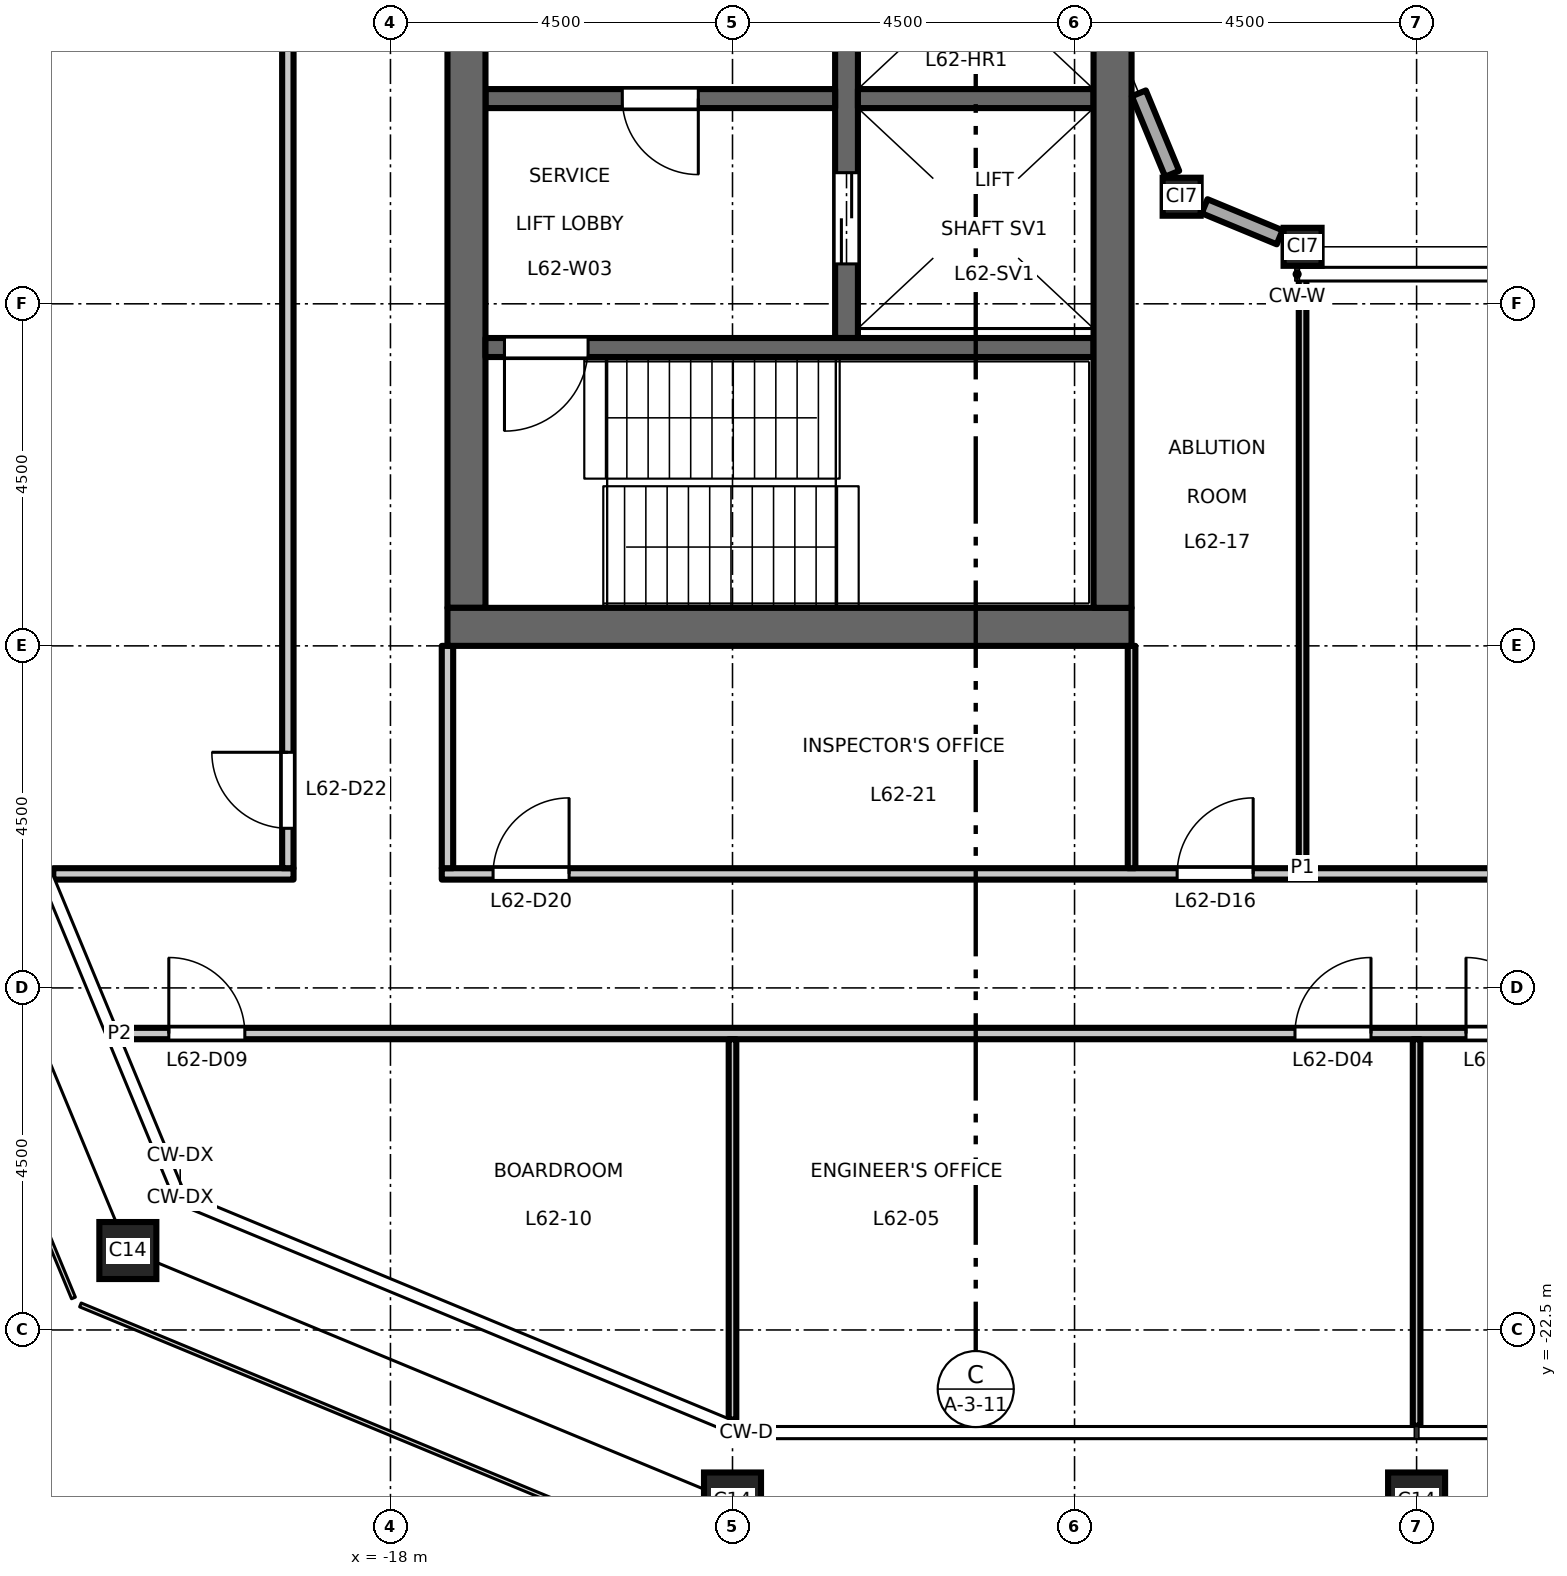
"""IFC4 building model, lengths in metres.
Left out: names, types, materials, properties, quantities, classifications, styles, units other than length and angle.
Written with IfcOpenShell. Run it as: python <this file> out.ifc"""

import sys

from ifc_helpers import new_model, si_unit, direction, frame, frame_2d, origin, origin_2d, place, context, subcontext, project, spatial, rectangle, hollow_rectangle, extrude, element, fill, save


model = new_model("IFC4")
c1 = context("Model", 3, precision=1e-05, world=origin(), true_north=direction((0.0, 1.0)))
c2 = subcontext(c1, "Body", "Model", "MODEL_VIEW")
j1 = project(units=[si_unit("LENGTHUNIT", "METRE"), si_unit("PLANEANGLEUNIT", "RADIAN")], contexts=[c1])
p1 = place(None, origin())
s1 = spatial("IfcSite", under=j1, at=p1, CompositionType="ELEMENT")
p2 = place(p1, origin())
s2 = spatial("IfcBuilding", under=s1, at=p2, CompositionType="ELEMENT")
p3 = place(p2, frame((0.0, 0.0, 289.7)))
s3 = spatial("IfcBuildingStorey", under=s2, at=p3, CompositionType="ELEMENT", Elevation=289.7)
for number, where, z_axis, x_axis in (
    (1, (-13.5, -24.75, 0.0), (0.0, 0.0, 1.0), (1.0, 0.0, 0.0)),
    (2, (-4.5, -24.75, 0.0), (0.0, 0.0, 1.0), (1.0, 0.0, 0.0)),
    (3, (-21.455, -21.455, 0.0), (0.0, 0.0, 1.0), (1.0, 0.0, 0.0)),
):
    element("IfcColumn", number, at=place(p3, frame(where, z_axis=z_axis, x_axis=x_axis)), inside=s3, PredefinedType="COLUMN", context=c2, shape_type="SweptSolid", body=[
        extrude(hollow_rectangle(XDim=0.75, YDim=0.75, WallThickness=0.04, at=origin_2d()), origin(), (0.0, 0.0, 1.0), 4.5),
    ])
for number, where, z_axis, x_axis in (
    (4, (-7.591, -7.591, 0.0), (0.0, 0.0, 1.0), (1.0, 0.0, 0.0)),
    (5, (-6.0, -8.25, 0.0), (0.0, 0.0, 1.0), (1.0, 0.0, 0.0)),
):
    element("IfcColumn", number, at=place(p3, frame(where, z_axis=z_axis, x_axis=x_axis)), inside=s3, PredefinedType="COLUMN", context=c2, shape_type="SweptSolid", body=[
        extrude(hollow_rectangle(XDim=0.5, YDim=0.5, WallThickness=0.025, at=origin_2d()), origin(), (0.0, 0.0, 1.0), 4.5),
    ])
p4 = place(p3, frame((-12.0, -9.45, 0.0), z_axis=(0.0, 0.0, 1.0), x_axis=(0.0, 1.0, 0.0)))
e6 = element("IfcWall", 6, at=p4, inside=s3, PredefinedType="SHEAR", context=c2, shape_type="SweptSolid", body=[
    extrude(rectangle(XDim=18.9, YDim=0.3, at=frame_2d((9.45, 0.0))), origin(), (0.0, 0.0, 1.0), 4.35),
])
p5 = place(p4, frame((4.725, 0.0, 0.0)))
e7 = element("IfcOpeningElement", 7, at=p5, cuts=e6, PredefinedType="OPENING", context=c2, shape_type="SweptSolid", body=[
    extrude(rectangle(XDim=1.1, YDim=2.1, at=frame_2d((0.55, 1.05))), frame((0.0, 0.16, 0.0), z_axis=(0.0, -1.0, 0.0), x_axis=(1.0, 0.0, 0.0)), (0.0, 0.0, 1.0), 0.32),
])
p6 = place(p4, frame((7.875, 0.0, 0.0)))
e8 = element("IfcOpeningElement", 8, at=p6, cuts=e6, PredefinedType="OPENING", context=c2, shape_type="SweptSolid", body=[
    extrude(rectangle(XDim=1.1, YDim=2.1, at=frame_2d((0.55, 1.05))), frame((0.0, 0.16, 0.0), z_axis=(0.0, -1.0, 0.0), x_axis=(1.0, 0.0, 0.0)), (0.0, 0.0, 1.0), 0.32),
])
p7 = place(p4, frame((11.025, 0.0, 0.0)))
e9 = element("IfcOpeningElement", 9, at=p7, cuts=e6, PredefinedType="OPENING", context=c2, shape_type="SweptSolid", body=[
    extrude(rectangle(XDim=1.1, YDim=2.1, at=frame_2d((0.55, 1.05))), frame((0.0, 0.16, 0.0), z_axis=(0.0, -1.0, 0.0), x_axis=(1.0, 0.0, 0.0)), (0.0, 0.0, 1.0), 0.32),
])
p8 = place(p4, frame((14.175, 0.0, 0.0)))
e10 = element("IfcOpeningElement", 10, at=p8, cuts=e6, PredefinedType="OPENING", context=c2, shape_type="SweptSolid", body=[
    extrude(rectangle(XDim=1.1, YDim=2.1, at=frame_2d((0.55, 1.05))), frame((0.0, 0.16, 0.0), z_axis=(0.0, -1.0, 0.0), x_axis=(1.0, 0.0, 0.0)), (0.0, 0.0, 1.0), 0.32),
])
p9 = place(p4, frame((16.725, 0.0, 0.0)))
e11 = element("IfcOpeningElement", 11, at=p9, cuts=e6, PredefinedType="OPENING", context=c2, shape_type="SweptSolid", body=[
    extrude(rectangle(XDim=1.2, YDim=2.1, at=frame_2d((0.6, 1.05))), frame((0.0, 0.16, 0.0), z_axis=(0.0, -1.0, 0.0), x_axis=(1.0, 0.0, 0.0)), (0.0, 0.0, 1.0), 0.32),
])
p10 = place(p4, frame((0.975, 0.0, 0.0)))
e12 = element("IfcOpeningElement", 12, at=p10, cuts=e6, PredefinedType="OPENING", context=c2, shape_type="SweptSolid", body=[
    extrude(rectangle(XDim=1.2, YDim=2.1, at=frame_2d((0.6, 1.05))), frame((0.0, 0.16, 0.0), z_axis=(0.0, -1.0, 0.0), x_axis=(1.0, 0.0, 0.0)), (0.0, 0.0, 1.0), 0.32),
])
p11 = place(p3, frame((-12.15, -6.3, 0.0), z_axis=(0.0, 0.0, 1.0), x_axis=(-1.0, 0.0, 0.0)))
e13 = element("IfcWall", 13, at=p11, inside=s3, PredefinedType="SHEAR", context=c2, shape_type="SweptSolid", body=[
    extrude(rectangle(XDim=4.6, YDim=0.25, at=frame_2d((2.3, 0.0))), origin(), (0.0, 0.0, 1.0), 4.35),
])
p12 = place(p11, frame((1.8, 0.0, 0.0)))
e14 = element("IfcOpeningElement", 14, at=p12, cuts=e13, PredefinedType="OPENING", context=c2, shape_type="SweptSolid", body=[
    extrude(rectangle(XDim=1.0, YDim=2.1, at=frame_2d((0.5, 1.05))), frame((0.0, 0.135, 0.0), z_axis=(0.0, -1.0, 0.0), x_axis=(1.0, 0.0, 0.0)), (0.0, 0.0, 1.0), 0.27),
])
p13 = place(p3, frame((-17.0, -13.0, 0.0), z_axis=(0.0, 0.0, 1.0), x_axis=(0.0, 1.0, 0.0)))
e15 = element("IfcWall", 15, at=p13, inside=s3, PredefinedType="SHEAR", context=c2, shape_type="SweptSolid", body=[
    extrude(rectangle(XDim=26.0, YDim=0.5, at=frame_2d((13.0, 0.0))), origin(), (0.0, 0.0, 1.0), 4.35),
])
p14 = place(p13, frame((16.825, 0.0, 0.0)))
e16 = element("IfcOpeningElement", 16, at=p14, cuts=e15, PredefinedType="OPENING", context=c2, shape_type="SweptSolid", body=[
    extrude(rectangle(XDim=1.8, YDim=2.1, at=frame_2d((0.9, 1.05))), frame((0.0, 0.26, 0.0), z_axis=(0.0, -1.0, 0.0), x_axis=(1.0, 0.0, 0.0)), (0.0, 0.0, 1.0), 0.52),
])
p15 = place(p13, frame((7.375, 0.0, 0.0)))
e17 = element("IfcOpeningElement", 17, at=p15, cuts=e15, PredefinedType="OPENING", context=c2, shape_type="SweptSolid", body=[
    extrude(rectangle(XDim=1.8, YDim=2.1, at=frame_2d((0.9, 1.05))), frame((0.0, 0.26, 0.0), z_axis=(0.0, -1.0, 0.0), x_axis=(1.0, 0.0, 0.0)), (0.0, 0.0, 1.0), 0.52),
])
p16 = place(p3, frame((-8.75, -6.3, 0.0), z_axis=(0.0, 0.0, 1.0), x_axis=(-1.0, 0.0, 0.0)))
e18 = element("IfcWall", 18, at=p16, inside=s3, PredefinedType="SHEAR", context=c2, shape_type="SweptSolid", body=[
    extrude(rectangle(XDim=3.1, YDim=0.25, at=frame_2d((1.55, 0.0))), origin(), (0.0, 0.0, 1.0), 4.35),
])
p17 = place(p3, frame((-8.75, -9.575, 0.0), z_axis=(0.0, 0.0, 1.0), x_axis=(-1.0, 0.0, 0.0)))
e19 = element("IfcWall", 19, at=p17, inside=s3, PredefinedType="SHEAR", context=c2, shape_type="SweptSolid", body=[
    extrude(rectangle(XDim=8.0, YDim=0.25, at=frame_2d((4.0, 0.0))), origin(), (0.0, 0.0, 1.0), 4.35),
])
p18 = place(p17, frame((6.65, 0.0, 0.0)))
e20 = element("IfcOpeningElement", 20, at=p18, cuts=e19, PredefinedType="OPENING", context=c2, shape_type="SweptSolid", body=[
    extrude(rectangle(XDim=1.1, YDim=2.1, at=frame_2d((0.55, 1.05))), frame((0.0, 0.135, 0.0), z_axis=(0.0, -1.0, 0.0), x_axis=(1.0, 0.0, 0.0)), (0.0, 0.0, 1.0), 0.27),
])
p19 = place(p3, frame((-8.25, -13.25, 0.0), z_axis=(0.0, 0.0, 1.0), x_axis=(-1.0, 0.0, 0.0)))
e21 = element("IfcWall", 21, at=p19, inside=s3, PredefinedType="SHEAR", context=c2, shape_type="SweptSolid", body=[
    extrude(rectangle(XDim=9.0, YDim=0.5, at=frame_2d((4.5, 0.0))), origin(), (0.0, 0.0, 1.0), 4.35),
])
p20 = place(p3, frame((-8.5, -13.0, 0.0), z_axis=(0.0, 0.0, 1.0), x_axis=(0.0, 1.0, 0.0)))
e22 = element("IfcWall", 22, at=p20, inside=s3, PredefinedType="SHEAR", context=c2, shape_type="SweptSolid", body=[
    extrude(rectangle(XDim=26.0, YDim=0.5, at=frame_2d((13.0, 0.0))), origin(), (0.0, 0.0, 1.0), 4.35),
])
p21 = place(p3, frame((-8.154, -6.231, 0.0), z_axis=(0.0, 0.0, 1.0), x_axis=(0.382571404949, -0.923925927829, 0.0)))
e23 = element("IfcWall", 23, at=p21, inside=s3, PredefinedType="STANDARD", context=c2, shape_type="SweptSolid", body=[
    extrude(rectangle(XDim=1.146, YDim=0.2, at=frame_2d((0.573, 0.0))), origin(), (0.0, 0.0, 1.0), 4.01),
])
p22 = place(p3, frame((-7.289, -7.716, 0.0), z_axis=(0.0, 0.0, 1.0), x_axis=(0.923919409248, -0.382587147216, 0.0)))
e24 = element("IfcWall", 24, at=p22, inside=s3, PredefinedType="STANDARD", context=c2, shape_type="SweptSolid", body=[
    extrude(rectangle(XDim=1.069, YDim=0.2, at=frame_2d((0.534, 0.0))), origin(), (0.0, 0.0, 1.0), 4.01),
])
p23 = place(p3, frame((-21.566, -18.6, 0.0), z_axis=(0.0, 0.0, 1.0), x_axis=(1.0, 0.0, 0.0)))
e25 = element("IfcWall", 25, at=p23, inside=s3, PredefinedType="PARTITIONING", context=c2, shape_type="SweptSolid", body=[
    extrude(rectangle(XDim=43.132, YDim=0.15, at=frame_2d((21.566, 0.0))), origin(), (0.0, 0.0, 1.0), 4.35),
])
p24 = place(p23, frame((15.466, 0.0, 0.0)))
e26 = element("IfcOpeningElement", 26, at=p24, cuts=e25, PredefinedType="OPENING", context=c2, shape_type="SweptSolid", body=[
    extrude(rectangle(XDim=1.0, YDim=2.1, at=frame_2d((0.5, 1.05))), frame((0.0, 0.085, 0.0), z_axis=(0.0, -1.0, 0.0), x_axis=(1.0, 0.0, 0.0)), (0.0, 0.0, 1.0), 0.17),
])
p25 = place(p23, frame((17.716, 0.0, 0.0)))
e27 = element("IfcOpeningElement", 27, at=p25, cuts=e25, PredefinedType="OPENING", context=c2, shape_type="SweptSolid", body=[
    extrude(rectangle(XDim=1.0, YDim=2.1, at=frame_2d((0.5, 1.05))), frame((0.0, 0.085, 0.0), z_axis=(0.0, -1.0, 0.0), x_axis=(1.0, 0.0, 0.0)), (0.0, 0.0, 1.0), 0.17),
])
p26 = place(p23, frame((33.466, 0.0, 0.0)))
e28 = element("IfcOpeningElement", 28, at=p26, cuts=e25, PredefinedType="OPENING", context=c2, shape_type="SweptSolid", body=[
    extrude(rectangle(XDim=1.0, YDim=2.1, at=frame_2d((0.5, 1.05))), frame((0.0, 0.085, 0.0), z_axis=(0.0, -1.0, 0.0), x_axis=(1.0, 0.0, 0.0)), (0.0, 0.0, 1.0), 0.17),
])
p27 = place(p23, frame((0.65, 0.0, 0.0)))
e29 = element("IfcOpeningElement", 29, at=p27, cuts=e25, PredefinedType="OPENING", context=c2, shape_type="SweptSolid", body=[
    extrude(rectangle(XDim=1.0, YDim=2.1, at=frame_2d((0.5, 1.05))), frame((0.0, 0.085, 0.0), z_axis=(0.0, -1.0, 0.0), x_axis=(1.0, 0.0, 0.0)), (0.0, 0.0, 1.0), 0.17),
])
p28 = place(p23, frame((41.466, 0.0, 0.0)))
e30 = element("IfcOpeningElement", 30, at=p28, cuts=e25, PredefinedType="OPENING", context=c2, shape_type="SweptSolid", body=[
    extrude(rectangle(XDim=1.0, YDim=2.1, at=frame_2d((0.5, 1.05))), frame((0.0, 0.085, 0.0), z_axis=(0.0, -1.0, 0.0), x_axis=(1.0, 0.0, 0.0)), (0.0, 0.0, 1.0), 0.17),
])
p29 = place(p3, frame((-22.436, -16.5, 0.0), z_axis=(0.0, 0.0, 1.0), x_axis=(1.0, 0.0, 0.0)))
e31 = element("IfcWall", 31, at=p29, inside=s3, PredefinedType="PARTITIONING", context=c2, shape_type="SweptSolid", body=[
    extrude(rectangle(XDim=3.161, YDim=0.15, at=frame_2d((1.581, 0.0))), origin(), (0.0, 0.0, 1.0), 4.35),
])
p30 = place(p3, frame((-17.325, -16.5, 0.0), z_axis=(0.0, 0.0, 1.0), x_axis=(1.0, 0.0, 0.0)))
e32 = element("IfcWall", 32, at=p30, inside=s3, PredefinedType="PARTITIONING", context=c2, shape_type="SweptSolid", body=[
    extrude(rectangle(XDim=34.65, YDim=0.15, at=frame_2d((17.325, 0.0))), origin(), (0.0, 0.0, 1.0), 4.35),
])
p31 = place(p30, frame((9.675, 0.0, 0.0)))
e33 = element("IfcOpeningElement", 33, at=p31, cuts=e32, PredefinedType="OPENING", context=c2, shape_type="SweptSolid", body=[
    extrude(rectangle(XDim=1.0, YDim=2.1, at=frame_2d((0.5, 1.05))), frame((0.0, 0.085, 0.0), z_axis=(0.0, -1.0, 0.0), x_axis=(1.0, 0.0, 0.0)), (0.0, 0.0, 1.0), 0.17),
])
p32 = place(p30, frame((23.925, 0.0, 0.0)))
e34 = element("IfcOpeningElement", 34, at=p32, cuts=e32, PredefinedType="OPENING", context=c2, shape_type="SweptSolid", body=[
    extrude(rectangle(XDim=1.0, YDim=2.1, at=frame_2d((0.5, 1.05))), frame((0.0, 0.085, 0.0), z_axis=(0.0, -1.0, 0.0), x_axis=(1.0, 0.0, 0.0)), (0.0, 0.0, 1.0), 0.17),
])
p33 = place(p30, frame((0.675, 0.0, 0.0)))
e35 = element("IfcOpeningElement", 35, at=p33, cuts=e32, PredefinedType="OPENING", context=c2, shape_type="SweptSolid", body=[
    extrude(rectangle(XDim=1.0, YDim=2.1, at=frame_2d((0.5, 1.05))), frame((0.0, 0.085, 0.0), z_axis=(0.0, -1.0, 0.0), x_axis=(1.0, 0.0, 0.0)), (0.0, 0.0, 1.0), 0.17),
])
p34 = place(p30, frame((32.925, 0.0, 0.0)))
e36 = element("IfcOpeningElement", 36, at=p34, cuts=e32, PredefinedType="OPENING", context=c2, shape_type="SweptSolid", body=[
    extrude(rectangle(XDim=1.0, YDim=2.1, at=frame_2d((0.5, 1.05))), frame((0.0, 0.085, 0.0), z_axis=(0.0, -1.0, 0.0), x_axis=(1.0, 0.0, 0.0)), (0.0, 0.0, 1.0), 0.17),
])
p35 = place(p3, frame((-19.35, -16.425, 0.0), z_axis=(0.0, 0.0, 1.0), x_axis=(0.0, 1.0, 0.0)))
e37 = element("IfcWall", 37, at=p35, inside=s3, PredefinedType="PARTITIONING", context=c2, shape_type="SweptSolid", body=[
    extrude(rectangle(XDim=32.85, YDim=0.15, at=frame_2d((16.425, 0.0))), origin(), (0.0, 0.0, 1.0), 4.35),
])
p36 = place(p35, frame((0.525, 0.0, 0.0)))
e38 = element("IfcOpeningElement", 38, at=p36, cuts=e37, PredefinedType="OPENING", context=c2, shape_type="SweptSolid", body=[
    extrude(rectangle(XDim=1.0, YDim=2.1, at=frame_2d((0.5, 1.05))), frame((0.0, 0.085, 0.0), z_axis=(0.0, -1.0, 0.0), x_axis=(1.0, 0.0, 0.0)), (0.0, 0.0, 1.0), 0.17),
])
p37 = place(p3, frame((-17.25, -16.425, 0.0), z_axis=(0.0, 0.0, 1.0), x_axis=(0.0, 1.0, 0.0)))
e39 = element("IfcWall", 39, at=p37, inside=s3, PredefinedType="PARTITIONING", context=c2, shape_type="SweptSolid", body=[
    extrude(rectangle(XDim=2.925, YDim=0.15, at=frame_2d((1.462, 0.0))), origin(), (0.0, 0.0, 1.0), 4.35),
])
p38 = place(p3, frame((-13.5, -23.678, 0.0), z_axis=(0.0, 0.0, 1.0), x_axis=(0.0, 1.0, 0.0)))
e40 = element("IfcWall", 40, at=p38, inside=s3, PredefinedType="PARTITIONING", context=c2, shape_type="SweptSolid", body=[
    extrude(rectangle(XDim=5.003, YDim=0.1, at=frame_2d((2.501, 0.0))), origin(), (0.0, 0.0, 1.0), 3.75),
])
p39 = place(p3, frame((-8.25, -16.425, 0.0), z_axis=(0.0, 0.0, 1.0), x_axis=(0.0, 1.0, 0.0)))
e41 = element("IfcWall", 41, at=p39, inside=s3, PredefinedType="PARTITIONING", context=c2, shape_type="SweptSolid", body=[
    extrude(rectangle(XDim=2.925, YDim=0.1, at=frame_2d((1.462, 0.0))), origin(), (0.0, 0.0, 1.0), 4.35),
])
p40 = place(p3, frame((-6.0, -16.425, 0.0), z_axis=(0.0, 0.0, 1.0), x_axis=(0.0, 1.0, 0.0)))
e42 = element("IfcWall", 42, at=p40, inside=s3, PredefinedType="PARTITIONING", context=c2, shape_type="SweptSolid", body=[
    extrude(rectangle(XDim=7.875, YDim=0.1, at=frame_2d((3.938, 0.0))), origin(), (0.0, 0.0, 1.0), 4.35),
])
p41 = place(p3, frame((-4.5, -23.76, 0.0), z_axis=(0.0, 0.0, 1.0), x_axis=(0.0, 1.0, 0.0)))
e43 = element("IfcWall", 43, at=p41, inside=s3, PredefinedType="PARTITIONING", context=c2, shape_type="SweptSolid", body=[
    extrude(rectangle(XDim=5.085, YDim=0.1, at=frame_2d((2.542, 0.0))), origin(), (0.0, 0.0, 1.0), 3.65),
])
p42 = place(p12, origin())
e44 = element("IfcDoor", 44, at=p42, inside=s3, OperationType="SINGLE_SWING_RIGHT", PredefinedType="DOOR", context=c2, shape_type="SweptSolid", body=[
    extrude(rectangle(XDim=1.0, YDim=2.1, at=frame_2d((0.5, 1.05))), frame((0.0, 0.025, 0.0), z_axis=(0.0, -1.0, 0.0), x_axis=(1.0, 0.0, 0.0)), (0.0, 0.0, 1.0), 0.05),
])
fill(e14, e44)
p43 = place(p18, origin())
e45 = element("IfcDoor", 45, at=p43, inside=s3, OperationType="SINGLE_SWING_LEFT", PredefinedType="DOOR", context=c2, shape_type="SweptSolid", body=[
    extrude(rectangle(XDim=1.1, YDim=2.1, at=frame_2d((0.55, 1.05))), frame((0.0, 0.025, 0.0), z_axis=(0.0, -1.0, 0.0), x_axis=(1.0, 0.0, 0.0)), (0.0, 0.0, 1.0), 0.05),
])
fill(e20, e45)
p44 = place(p10, origin())
e46 = element("IfcDoor", 46, at=p44, inside=s3, OperationType="DOUBLE_DOOR_SLIDING", PredefinedType="DOOR", context=c2, shape_type="SweptSolid", body=[
    extrude(rectangle(XDim=1.2, YDim=2.1, at=frame_2d((0.6, 1.05))), frame((0.0, 0.025, 0.0), z_axis=(0.0, -1.0, 0.0), x_axis=(1.0, 0.0, 0.0)), (0.0, 0.0, 1.0), 0.05),
])
fill(e12, e46)
p45 = place(p24, origin())
e47 = element("IfcDoor", 47, at=p45, inside=s3, OperationType="SINGLE_SWING_RIGHT", PredefinedType="DOOR", context=c2, shape_type="SweptSolid", body=[
    extrude(rectangle(XDim=1.0, YDim=2.1, at=frame_2d((0.5, 1.05))), frame((0.0, 0.025, 0.0), z_axis=(0.0, -1.0, 0.0), x_axis=(1.0, 0.0, 0.0)), (0.0, 0.0, 1.0), 0.05),
])
fill(e26, e47)
p46 = place(p25, origin())
e48 = element("IfcDoor", 48, at=p46, inside=s3, OperationType="SINGLE_SWING_LEFT", PredefinedType="DOOR", context=c2, shape_type="SweptSolid", body=[
    extrude(rectangle(XDim=1.0, YDim=2.1, at=frame_2d((0.5, 1.05))), frame((0.0, 0.025, 0.0), z_axis=(0.0, -1.0, 0.0), x_axis=(1.0, 0.0, 0.0)), (0.0, 0.0, 1.0), 0.05),
])
fill(e27, e48)
p47 = place(p27, origin())
e49 = element("IfcDoor", 49, at=p47, inside=s3, OperationType="SINGLE_SWING_LEFT", PredefinedType="DOOR", context=c2, shape_type="SweptSolid", body=[
    extrude(rectangle(XDim=1.0, YDim=2.1, at=frame_2d((0.5, 1.05))), frame((0.0, 0.025, 0.0), z_axis=(0.0, -1.0, 0.0), x_axis=(1.0, 0.0, 0.0)), (0.0, 0.0, 1.0), 0.05),
])
fill(e29, e49)
p48 = place(p31, origin())
e50 = element("IfcDoor", 50, at=p48, inside=s3, OperationType="SINGLE_SWING_RIGHT", PredefinedType="DOOR", context=c2, shape_type="SweptSolid", body=[
    extrude(rectangle(XDim=1.0, YDim=2.1, at=frame_2d((0.5, 1.05))), frame((0.0, 0.025, 0.0), z_axis=(0.0, -1.0, 0.0), x_axis=(1.0, 0.0, 0.0)), (0.0, 0.0, 1.0), 0.05),
])
fill(e33, e50)
p49 = place(p33, origin())
e51 = element("IfcDoor", 51, at=p49, inside=s3, OperationType="SINGLE_SWING_RIGHT", PredefinedType="DOOR", context=c2, shape_type="SweptSolid", body=[
    extrude(rectangle(XDim=1.0, YDim=2.1, at=frame_2d((0.5, 1.05))), frame((0.0, 0.025, 0.0), z_axis=(0.0, -1.0, 0.0), x_axis=(1.0, 0.0, 0.0)), (0.0, 0.0, 1.0), 0.05),
])
fill(e35, e51)
p50 = place(p36, origin())
e52 = element("IfcDoor", 52, at=p50, inside=s3, OperationType="SINGLE_SWING_RIGHT", PredefinedType="DOOR", context=c2, shape_type="SweptSolid", body=[
    extrude(rectangle(XDim=1.0, YDim=2.1, at=frame_2d((0.5, 1.05))), frame((0.0, 0.025, 0.0), z_axis=(0.0, -1.0, 0.0), x_axis=(1.0, 0.0, 0.0)), (0.0, 0.0, 1.0), 0.05),
])
fill(e38, e52)
save(model, sys.argv[1])
